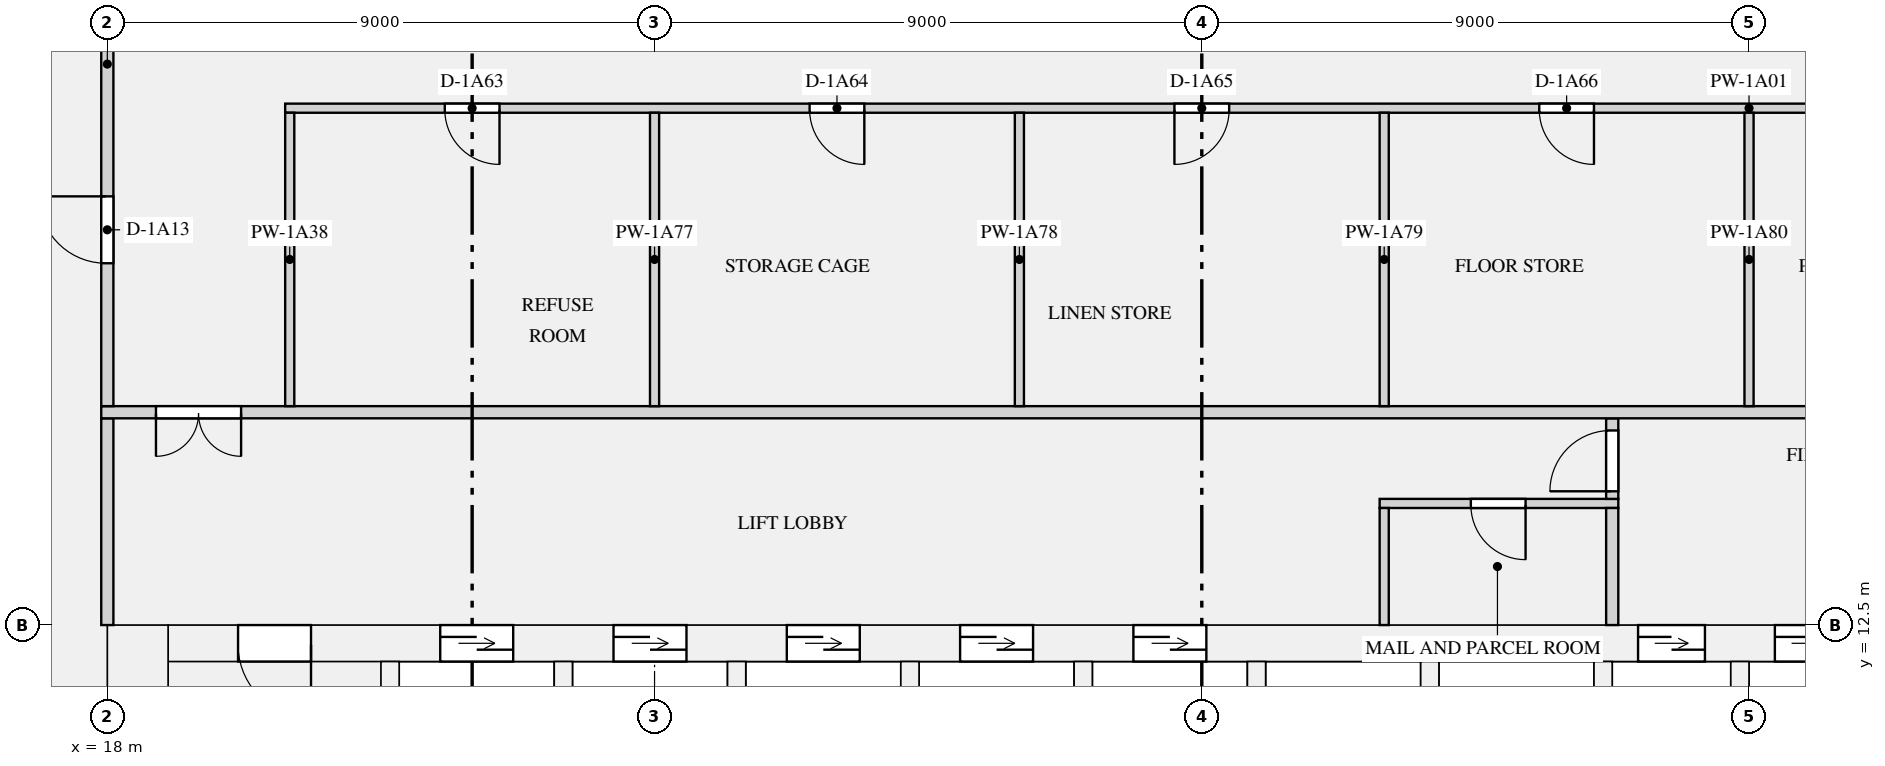
"""IFC4 building model, lengths in metres.
Left out: names, types, materials, properties, quantities, classifications, styles, units other than length and angle.
Written with IfcOpenShell. Run it as: python <this file> out.ifc"""

import sys

from ifc_helpers import new_model, si_unit, direction, frame, frame_2d, origin, place, context, subcontext, project, spatial, rectangle, extrude, element, fill, save


model = new_model("IFC4")
c1 = context("Model", 3, precision=1e-05, world=origin(), true_north=direction((0.0, 1.0)))
c2 = subcontext(c1, "Body", "Model", "MODEL_VIEW")
j1 = project(units=[si_unit("LENGTHUNIT", "METRE"), si_unit("PLANEANGLEUNIT", "RADIAN")], contexts=[c1])
p1 = place(None, origin())
s1 = spatial("IfcSite", under=j1, at=p1, CompositionType="ELEMENT")
p2 = place(p1, origin())
s2 = spatial("IfcBuilding", under=s1, at=p2, CompositionType="ELEMENT")
p3 = place(p2, frame((0.0, 0.0, 19.5)))
s3 = spatial("IfcBuildingStorey", under=s2, at=p3, CompositionType="ELEMENT", Elevation=19.5)
p4 = place(p3, frame((18.5, 0.0, 0.0), z_axis=(0.0, 0.0, 1.0), x_axis=(0.0, 1.0, 0.0)))
e1 = element("IfcWall", 1, at=p4, inside=s3, PredefinedType="SHEAR", context=c2, shape_type="SweptSolid", body=[
    extrude(rectangle(XDim=12.5, YDim=1.0, at=frame_2d((6.25, 0.0))), origin(), (0.0, 0.0, 1.0), 3.15),
])
p5 = place(p3, frame((19.0, 12.2, 0.0), z_axis=(0.0, 0.0, 1.0), x_axis=(1.0, 0.0, 0.0)))
e2 = element("IfcWall", 2, at=p5, inside=s3, PredefinedType="SHEAR", context=c2, shape_type="SweptSolid", body=[
    extrude(rectangle(XDim=34.0, YDim=0.6, at=frame_2d((17.0, 0.0))), origin(), (0.0, 0.0, 1.0), 3.15),
])
p6 = place(p5, frame((4.475, 0.0, 0.0)))
e3 = element("IfcOpeningElement", 3, at=p6, cuts=e2, PredefinedType="OPENING", context=c2, shape_type="SweptSolid", body=[
    extrude(rectangle(XDim=1.2, YDim=2.1, at=frame_2d((0.6, 1.05))), frame((0.0, 0.31, 0.0), z_axis=(0.0, -1.0, 0.0), x_axis=(1.0, 0.0, 0.0)), (0.0, 0.0, 1.0), 0.62),
])
p7 = place(p5, frame((7.325, 0.0, 0.0)))
e4 = element("IfcOpeningElement", 4, at=p7, cuts=e2, PredefinedType="OPENING", context=c2, shape_type="SweptSolid", body=[
    extrude(rectangle(XDim=1.2, YDim=2.1, at=frame_2d((0.6, 1.05))), frame((0.0, 0.31, 0.0), z_axis=(0.0, -1.0, 0.0), x_axis=(1.0, 0.0, 0.0)), (0.0, 0.0, 1.0), 0.62),
])
p8 = place(p5, frame((10.175, 0.0, 0.0)))
e5 = element("IfcOpeningElement", 5, at=p8, cuts=e2, PredefinedType="OPENING", context=c2, shape_type="SweptSolid", body=[
    extrude(rectangle(XDim=1.2, YDim=2.1, at=frame_2d((0.6, 1.05))), frame((0.0, 0.31, 0.0), z_axis=(0.0, -1.0, 0.0), x_axis=(1.0, 0.0, 0.0)), (0.0, 0.0, 1.0), 0.62),
])
p9 = place(p5, frame((13.025, 0.0, 0.0)))
e6 = element("IfcOpeningElement", 6, at=p9, cuts=e2, PredefinedType="OPENING", context=c2, shape_type="SweptSolid", body=[
    extrude(rectangle(XDim=1.2, YDim=2.1, at=frame_2d((0.6, 1.05))), frame((0.0, 0.31, 0.0), z_axis=(0.0, -1.0, 0.0), x_axis=(1.0, 0.0, 0.0)), (0.0, 0.0, 1.0), 0.62),
])
p10 = place(p5, frame((15.875, 0.0, 0.0)))
e7 = element("IfcOpeningElement", 7, at=p10, cuts=e2, PredefinedType="OPENING", context=c2, shape_type="SweptSolid", body=[
    extrude(rectangle(XDim=1.2, YDim=2.1, at=frame_2d((0.6, 1.05))), frame((0.0, 0.31, 0.0), z_axis=(0.0, -1.0, 0.0), x_axis=(1.0, 0.0, 0.0)), (0.0, 0.0, 1.0), 0.62),
])
p11 = place(p5, frame((24.175, 0.0, 0.0)))
e8 = element("IfcOpeningElement", 8, at=p11, cuts=e2, PredefinedType="OPENING", context=c2, shape_type="SweptSolid", body=[
    extrude(rectangle(XDim=1.1, YDim=2.1, at=frame_2d((0.55, 1.05))), frame((0.0, 0.31, 0.0), z_axis=(0.0, -1.0, 0.0), x_axis=(1.0, 0.0, 0.0)), (0.0, 0.0, 1.0), 0.62),
])
p12 = place(p5, frame((26.425, 0.0, 0.0)))
e9 = element("IfcOpeningElement", 9, at=p12, cuts=e2, PredefinedType="OPENING", context=c2, shape_type="SweptSolid", body=[
    extrude(rectangle(XDim=1.1, YDim=2.1, at=frame_2d((0.55, 1.05))), frame((0.0, 0.31, 0.0), z_axis=(0.0, -1.0, 0.0), x_axis=(1.0, 0.0, 0.0)), (0.0, 0.0, 1.0), 0.62),
])
p13 = place(p5, frame((28.675, 0.0, 0.0)))
e10 = element("IfcOpeningElement", 10, at=p13, cuts=e2, PredefinedType="OPENING", context=c2, shape_type="SweptSolid", body=[
    extrude(rectangle(XDim=1.1, YDim=2.1, at=frame_2d((0.55, 1.05))), frame((0.0, 0.31, 0.0), z_axis=(0.0, -1.0, 0.0), x_axis=(1.0, 0.0, 0.0)), (0.0, 0.0, 1.0), 0.62),
])
p14 = place(p5, frame((1.15, 0.0, 0.0)))
e11 = element("IfcOpeningElement", 11, at=p14, cuts=e2, PredefinedType="OPENING", context=c2, shape_type="SweptSolid", body=[
    extrude(rectangle(XDim=1.2, YDim=2.1, at=frame_2d((0.6, 1.05))), frame((0.0, 0.31, 0.0), z_axis=(0.0, -1.0, 0.0), x_axis=(1.0, 0.0, 0.0)), (0.0, 0.0, 1.0), 0.62),
])
p15 = place(p5, frame((31.65, 0.0, 0.0)))
e12 = element("IfcOpeningElement", 12, at=p15, cuts=e2, PredefinedType="OPENING", context=c2, shape_type="SweptSolid", body=[
    extrude(rectangle(XDim=1.2, YDim=2.1, at=frame_2d((0.6, 1.05))), frame((0.0, 0.31, 0.0), z_axis=(0.0, -1.0, 0.0), x_axis=(1.0, 0.0, 0.0)), (0.0, 0.0, 1.0), 0.62),
])
for number, where, z_axis, x_axis in (
    (13, (22.65, 9.35, 0.0), (0.0, 0.0, 1.0), (0.0, 1.0, 0.0)),
    (14, (25.5, 9.35, 0.0), (0.0, 0.0, 1.0), (0.0, 1.0, 0.0)),
    (15, (28.35, 9.35, 0.0), (0.0, 0.0, 1.0), (0.0, 1.0, 0.0)),
    (16, (31.2, 9.35, 0.0), (0.0, 0.0, 1.0), (0.0, 1.0, 0.0)),
    (17, (34.05, 9.35, 0.0), (0.0, 0.0, 1.0), (0.0, 1.0, 0.0)),
    (18, (36.9, 9.35, 0.0), (0.0, 0.0, 1.0), (0.0, 1.0, 0.0)),
    (19, (39.75, 9.35, 0.0), (0.0, 0.0, 1.0), (0.0, 1.0, 0.0)),
):
    element("IfcWall", number, at=place(p3, frame(where, z_axis=z_axis, x_axis=x_axis)), inside=s3, PredefinedType="SHEAR", context=c2, shape_type="SweptSolid", body=[
        extrude(rectangle(XDim=2.55, YDim=0.3, at=frame_2d((1.275, 0.0))), origin(), (0.0, 0.0, 1.0), 3.15),
    ])
for number, where, z_axis, x_axis in (
    (20, (42.6, 8.25, 0.0), (0.0, 0.0, 1.0), (0.0, 1.0, 0.0)),
    (21, (44.85, 8.25, 0.0), (0.0, 0.0, 1.0), (0.0, 1.0, 0.0)),
):
    element("IfcWall", number, at=place(p3, frame(where, z_axis=z_axis, x_axis=x_axis)), inside=s3, PredefinedType="SHEAR", context=c2, shape_type="SweptSolid", body=[
        extrude(rectangle(XDim=3.65, YDim=0.3, at=frame_2d((1.825, 0.0))), origin(), (0.0, 0.0, 1.0), 3.15),
    ])
p16 = place(p3, frame((38.925, 14.5, 0.0), z_axis=(0.0, 0.0, 1.0), x_axis=(1.0, 0.0, 0.0)))
e22 = element("IfcWall", 22, at=p16, inside=s3, PredefinedType="PARTITIONING", context=c2, shape_type="SweptSolid", body=[
    extrude(rectangle(XDim=3.925, YDim=0.15, at=frame_2d((1.962, 0.0))), origin(), (0.0, 0.0, 1.0), 2.83),
])
p17 = place(p16, frame((1.5, 0.0, 0.0)))
e23 = element("IfcOpeningElement", 23, at=p17, cuts=e22, PredefinedType="OPENING", context=c2, shape_type="SweptSolid", body=[
    extrude(rectangle(XDim=0.9, YDim=2.1, at=frame_2d((0.45, 1.05))), frame((0.0, 0.085, 0.0), z_axis=(0.0, -1.0, 0.0), x_axis=(1.0, 0.0, 0.0)), (0.0, 0.0, 1.0), 0.17),
])
p18 = place(p3, frame((18.0, 12.5, 0.0), z_axis=(0.0, 0.0, 1.0), x_axis=(0.0, 1.0, 0.0)))
e24 = element("IfcWall", 24, at=p18, inside=s3, PredefinedType="PARTITIONING", context=c2, shape_type="SweptSolid", body=[
    extrude(rectangle(XDim=3.4, YDim=0.2, at=frame_2d((1.7, 0.0))), origin(), (0.0, 0.0, 1.0), 2.83),
])
p19 = place(p3, frame((39.0, 12.5, 0.0), z_axis=(0.0, 0.0, 1.0), x_axis=(0.0, 1.0, 0.0)))
e25 = element("IfcWall", 25, at=p19, inside=s3, PredefinedType="PARTITIONING", context=c2, shape_type="SweptSolid", body=[
    extrude(rectangle(XDim=1.925, YDim=0.15, at=frame_2d((0.962, 0.0))), origin(), (0.0, 0.0, 1.0), 2.83),
])
p20 = place(p3, frame((42.75, 12.5, 0.0), z_axis=(0.0, 0.0, 1.0), x_axis=(0.0, 1.0, 0.0)))
e26 = element("IfcWall", 26, at=p20, inside=s3, PredefinedType="PARTITIONING", context=c2, shape_type="SweptSolid", body=[
    extrude(rectangle(XDim=1.925, YDim=0.2, at=frame_2d((0.962, 0.0))), origin(), (0.0, 0.0, 1.0), 2.83),
])
p21 = place(p3, frame((42.75, 14.575, 0.0), z_axis=(0.0, 0.0, 1.0), x_axis=(0.0, 1.0, 0.0)))
e27 = element("IfcWall", 27, at=p21, inside=s3, PredefinedType="PARTITIONING", context=c2, shape_type="SweptSolid", body=[
    extrude(rectangle(XDim=1.325, YDim=0.2, at=frame_2d((0.663, 0.0))), origin(), (0.0, 0.0, 1.0), 2.83),
])
p22 = place(p21, frame((0.125, 0.0, 0.0)))
e28 = element("IfcOpeningElement", 28, at=p22, cuts=e27, PredefinedType="OPENING", context=c2, shape_type="SweptSolid", body=[
    extrude(rectangle(XDim=1.0, YDim=2.1, at=frame_2d((0.5, 1.05))), frame((0.0, 0.11, 0.0), z_axis=(0.0, -1.0, 0.0), x_axis=(1.0, 0.0, 0.0)), (0.0, 0.0, 1.0), 0.22),
])
p23 = place(p3, frame((20.925, 21.0, 0.0), z_axis=(0.0, 0.0, 1.0), x_axis=(1.0, 0.0, 0.0)))
e29 = element("IfcWall", 29, at=p23, inside=s3, PredefinedType="PARTITIONING", context=c2, shape_type="SweptSolid", body=[
    extrude(rectangle(XDim=30.15, YDim=0.15, at=frame_2d((15.075, 0.0))), origin(), (0.0, 0.0, 1.0), 2.83),
])
p24 = place(p23, frame((2.625, 0.0, 0.0)))
e30 = element("IfcOpeningElement", 30, at=p24, cuts=e29, PredefinedType="OPENING", context=c2, shape_type="SweptSolid", body=[
    extrude(rectangle(XDim=0.9, YDim=2.1, at=frame_2d((0.45, 1.05))), frame((0.0, 0.085, 0.0), z_axis=(0.0, -1.0, 0.0), x_axis=(1.0, 0.0, 0.0)), (0.0, 0.0, 1.0), 0.17),
])
p25 = place(p23, frame((8.625, 0.0, 0.0)))
e31 = element("IfcOpeningElement", 31, at=p25, cuts=e29, PredefinedType="OPENING", context=c2, shape_type="SweptSolid", body=[
    extrude(rectangle(XDim=0.9, YDim=2.1, at=frame_2d((0.45, 1.05))), frame((0.0, 0.085, 0.0), z_axis=(0.0, -1.0, 0.0), x_axis=(1.0, 0.0, 0.0)), (0.0, 0.0, 1.0), 0.17),
])
p26 = place(p23, frame((14.625, 0.0, 0.0)))
e32 = element("IfcOpeningElement", 32, at=p26, cuts=e29, PredefinedType="OPENING", context=c2, shape_type="SweptSolid", body=[
    extrude(rectangle(XDim=0.9, YDim=2.1, at=frame_2d((0.45, 1.05))), frame((0.0, 0.085, 0.0), z_axis=(0.0, -1.0, 0.0), x_axis=(1.0, 0.0, 0.0)), (0.0, 0.0, 1.0), 0.17),
])
p27 = place(p23, frame((20.625, 0.0, 0.0)))
e33 = element("IfcOpeningElement", 33, at=p27, cuts=e29, PredefinedType="OPENING", context=c2, shape_type="SweptSolid", body=[
    extrude(rectangle(XDim=0.9, YDim=2.1, at=frame_2d((0.45, 1.05))), frame((0.0, 0.085, 0.0), z_axis=(0.0, -1.0, 0.0), x_axis=(1.0, 0.0, 0.0)), (0.0, 0.0, 1.0), 0.17),
])
p28 = place(p23, frame((26.625, 0.0, 0.0)))
e34 = element("IfcOpeningElement", 34, at=p28, cuts=e29, PredefinedType="OPENING", context=c2, shape_type="SweptSolid", body=[
    extrude(rectangle(XDim=0.9, YDim=2.1, at=frame_2d((0.45, 1.05))), frame((0.0, 0.085, 0.0), z_axis=(0.0, -1.0, 0.0), x_axis=(1.0, 0.0, 0.0)), (0.0, 0.0, 1.0), 0.17),
])
p29 = place(p3, frame((17.9, 16.0, 0.0), z_axis=(0.0, 0.0, 1.0), x_axis=(1.0, 0.0, 0.0)))
e35 = element("IfcWall", 35, at=p29, inside=s3, PredefinedType="PARTITIONING", context=c2, shape_type="SweptSolid", body=[
    extrude(rectangle(XDim=36.2, YDim=0.2, at=frame_2d((18.1, 0.0))), origin(), (0.0, 0.0, 1.0), 2.83),
])
p30 = place(p29, frame((0.9, 0.0, 0.0)))
e36 = element("IfcOpeningElement", 36, at=p30, cuts=e35, PredefinedType="OPENING", context=c2, shape_type="SweptSolid", body=[
    extrude(rectangle(XDim=1.4, YDim=2.1, at=frame_2d((0.7, 1.05))), frame((0.0, 0.11, 0.0), z_axis=(0.0, -1.0, 0.0), x_axis=(1.0, 0.0, 0.0)), (0.0, 0.0, 1.0), 0.22),
])
p31 = place(p29, frame((33.9, 0.0, 0.0)))
e37 = element("IfcOpeningElement", 37, at=p31, cuts=e35, PredefinedType="OPENING", context=c2, shape_type="SweptSolid", body=[
    extrude(rectangle(XDim=1.4, YDim=2.1, at=frame_2d((0.7, 1.05))), frame((0.0, 0.11, 0.0), z_axis=(0.0, -1.0, 0.0), x_axis=(1.0, 0.0, 0.0)), (0.0, 0.0, 1.0), 0.22),
])
p32 = place(p3, frame((18.0, 16.1, 0.0), z_axis=(0.0, 0.0, 1.0), x_axis=(0.0, 1.0, 0.0)))
e38 = element("IfcWall", 38, at=p32, inside=s3, PredefinedType="PARTITIONING", context=c2, shape_type="SweptSolid", body=[
    extrude(rectangle(XDim=7.8, YDim=0.2, at=frame_2d((3.9, 0.0))), origin(), (0.0, 0.0, 1.0), 2.83),
])
p33 = place(p32, frame((2.35, 0.0, 0.0)))
e39 = element("IfcOpeningElement", 39, at=p33, cuts=e38, PredefinedType="OPENING", context=c2, shape_type="SweptSolid", body=[
    extrude(rectangle(XDim=1.1, YDim=2.1, at=frame_2d((0.55, 1.05))), frame((0.0, 0.11, 0.0), z_axis=(0.0, -1.0, 0.0), x_axis=(1.0, 0.0, 0.0)), (0.0, 0.0, 1.0), 0.22),
])
for number, where, z_axis, x_axis in (
    (40, (21.0, 16.1, 0.0), (0.0, 0.0, 1.0), (0.0, 1.0, 0.0)),
    (41, (27.0, 16.1, 0.0), (0.0, 0.0, 1.0), (0.0, 1.0, 0.0)),
    (42, (33.0, 16.1, 0.0), (0.0, 0.0, 1.0), (0.0, 1.0, 0.0)),
    (43, (39.0, 16.1, 0.0), (0.0, 0.0, 1.0), (0.0, 1.0, 0.0)),
    (44, (45.0, 16.1, 0.0), (0.0, 0.0, 1.0), (0.0, 1.0, 0.0)),
):
    element("IfcWall", number, at=place(p3, frame(where, z_axis=z_axis, x_axis=x_axis)), inside=s3, PredefinedType="PARTITIONING", context=c2, shape_type="SweptSolid", body=[
        extrude(rectangle(XDim=4.825, YDim=0.15, at=frame_2d((2.413, 0.0))), origin(), (0.0, 0.0, 1.0), 2.83),
    ])
p34 = place(p6, origin())
e45 = element("IfcDoor", 45, at=p34, inside=s3, OperationType="DOUBLE_DOOR_SLIDING", PredefinedType="DOOR", context=c2, shape_type="SweptSolid", body=[
    extrude(rectangle(XDim=1.2, YDim=2.1, at=frame_2d((0.6, 1.05))), frame((0.0, 0.025, 0.0), z_axis=(0.0, -1.0, 0.0), x_axis=(1.0, 0.0, 0.0)), (0.0, 0.0, 1.0), 0.05),
])
fill(e3, e45)
p35 = place(p7, origin())
e46 = element("IfcDoor", 46, at=p35, inside=s3, OperationType="DOUBLE_DOOR_SLIDING", PredefinedType="DOOR", context=c2, shape_type="SweptSolid", body=[
    extrude(rectangle(XDim=1.2, YDim=2.1, at=frame_2d((0.6, 1.05))), frame((0.0, 0.025, 0.0), z_axis=(0.0, -1.0, 0.0), x_axis=(1.0, 0.0, 0.0)), (0.0, 0.0, 1.0), 0.05),
])
fill(e4, e46)
p36 = place(p8, origin())
e47 = element("IfcDoor", 47, at=p36, inside=s3, OperationType="DOUBLE_DOOR_SLIDING", PredefinedType="DOOR", context=c2, shape_type="SweptSolid", body=[
    extrude(rectangle(XDim=1.2, YDim=2.1, at=frame_2d((0.6, 1.05))), frame((0.0, 0.025, 0.0), z_axis=(0.0, -1.0, 0.0), x_axis=(1.0, 0.0, 0.0)), (0.0, 0.0, 1.0), 0.05),
])
fill(e5, e47)
p37 = place(p9, origin())
e48 = element("IfcDoor", 48, at=p37, inside=s3, OperationType="DOUBLE_DOOR_SLIDING", PredefinedType="DOOR", context=c2, shape_type="SweptSolid", body=[
    extrude(rectangle(XDim=1.2, YDim=2.1, at=frame_2d((0.6, 1.05))), frame((0.0, 0.025, 0.0), z_axis=(0.0, -1.0, 0.0), x_axis=(1.0, 0.0, 0.0)), (0.0, 0.0, 1.0), 0.05),
])
fill(e6, e48)
p38 = place(p10, origin())
e49 = element("IfcDoor", 49, at=p38, inside=s3, OperationType="DOUBLE_DOOR_SLIDING", PredefinedType="DOOR", context=c2, shape_type="SweptSolid", body=[
    extrude(rectangle(XDim=1.2, YDim=2.1, at=frame_2d((0.6, 1.05))), frame((0.0, 0.025, 0.0), z_axis=(0.0, -1.0, 0.0), x_axis=(1.0, 0.0, 0.0)), (0.0, 0.0, 1.0), 0.05),
])
fill(e7, e49)
p39 = place(p11, origin())
e50 = element("IfcDoor", 50, at=p39, inside=s3, OperationType="DOUBLE_DOOR_SLIDING", PredefinedType="DOOR", context=c2, shape_type="SweptSolid", body=[
    extrude(rectangle(XDim=1.1, YDim=2.1, at=frame_2d((0.55, 1.05))), frame((0.0, 0.025, 0.0), z_axis=(0.0, -1.0, 0.0), x_axis=(1.0, 0.0, 0.0)), (0.0, 0.0, 1.0), 0.05),
])
fill(e8, e50)
p40 = place(p12, origin())
e51 = element("IfcDoor", 51, at=p40, inside=s3, OperationType="DOUBLE_DOOR_SLIDING", PredefinedType="DOOR", context=c2, shape_type="SweptSolid", body=[
    extrude(rectangle(XDim=1.1, YDim=2.1, at=frame_2d((0.55, 1.05))), frame((0.0, 0.025, 0.0), z_axis=(0.0, -1.0, 0.0), x_axis=(1.0, 0.0, 0.0)), (0.0, 0.0, 1.0), 0.05),
])
fill(e9, e51)
p41 = place(p17, frame((0.9, 0.0, 0.0), z_axis=(0.0, 0.0, 1.0), x_axis=(-1.0, 0.0, 0.0)))
e52 = element("IfcDoor", 52, at=p41, inside=s3, OperationType="SINGLE_SWING_LEFT", PredefinedType="DOOR", context=c2, shape_type="SweptSolid", body=[
    extrude(rectangle(XDim=0.9, YDim=2.1, at=frame_2d((0.45, 1.05))), frame((0.0, 0.025, 0.0), z_axis=(0.0, -1.0, 0.0), x_axis=(1.0, 0.0, 0.0)), (0.0, 0.0, 1.0), 0.05),
])
fill(e23, e52)
p42 = place(p14, frame((1.2, 0.0, 0.0), z_axis=(0.0, 0.0, 1.0), x_axis=(-1.0, 0.0, 0.0)))
e53 = element("IfcDoor", 53, at=p42, inside=s3, OperationType="SINGLE_SWING_LEFT", PredefinedType="DOOR", context=c2, shape_type="SweptSolid", body=[
    extrude(rectangle(XDim=1.2, YDim=2.1, at=frame_2d((0.6, 1.05))), frame((0.0, 0.025, 0.0), z_axis=(0.0, -1.0, 0.0), x_axis=(1.0, 0.0, 0.0)), (0.0, 0.0, 1.0), 0.05),
])
fill(e11, e53)
p43 = place(p22, origin())
e54 = element("IfcDoor", 54, at=p43, inside=s3, OperationType="SINGLE_SWING_LEFT", PredefinedType="DOOR", context=c2, shape_type="SweptSolid", body=[
    extrude(rectangle(XDim=1.0, YDim=2.1, at=frame_2d((0.5, 1.05))), frame((0.0, 0.025, 0.0), z_axis=(0.0, -1.0, 0.0), x_axis=(1.0, 0.0, 0.0)), (0.0, 0.0, 1.0), 0.05),
])
fill(e28, e54)
p44 = place(p30, frame((1.4, 0.0, 0.0), z_axis=(0.0, 0.0, 1.0), x_axis=(-1.0, 0.0, 0.0)))
e55 = element("IfcDoor", 55, at=p44, inside=s3, OperationType="DOUBLE_DOOR_SINGLE_SWING", PredefinedType="DOOR", context=c2, shape_type="SweptSolid", body=[
    extrude(rectangle(XDim=1.4, YDim=2.1, at=frame_2d((0.7, 1.05))), frame((0.0, 0.025, 0.0), z_axis=(0.0, -1.0, 0.0), x_axis=(1.0, 0.0, 0.0)), (0.0, 0.0, 1.0), 0.05),
])
fill(e36, e55)
p45 = place(p33, origin())
e56 = element("IfcDoor", 56, at=p45, inside=s3, OperationType="SINGLE_SWING_RIGHT", PredefinedType="DOOR", context=c2, shape_type="SweptSolid", body=[
    extrude(rectangle(XDim=1.1, YDim=2.1, at=frame_2d((0.55, 1.05))), frame((0.0, 0.025, 0.0), z_axis=(0.0, -1.0, 0.0), x_axis=(1.0, 0.0, 0.0)), (0.0, 0.0, 1.0), 0.05),
])
fill(e39, e56)
p46 = place(p24, frame((0.9, 0.0, 0.0), z_axis=(0.0, 0.0, 1.0), x_axis=(-1.0, 0.0, 0.0)))
e57 = element("IfcDoor", 57, at=p46, inside=s3, OperationType="SINGLE_SWING_LEFT", PredefinedType="DOOR", context=c2, shape_type="SweptSolid", body=[
    extrude(rectangle(XDim=0.9, YDim=2.1, at=frame_2d((0.45, 1.05))), frame((0.0, 0.025, 0.0), z_axis=(0.0, -1.0, 0.0), x_axis=(1.0, 0.0, 0.0)), (0.0, 0.0, 1.0), 0.05),
])
fill(e30, e57)
p47 = place(p25, frame((0.9, 0.0, 0.0), z_axis=(0.0, 0.0, 1.0), x_axis=(-1.0, 0.0, 0.0)))
e58 = element("IfcDoor", 58, at=p47, inside=s3, OperationType="SINGLE_SWING_LEFT", PredefinedType="DOOR", context=c2, shape_type="SweptSolid", body=[
    extrude(rectangle(XDim=0.9, YDim=2.1, at=frame_2d((0.45, 1.05))), frame((0.0, 0.025, 0.0), z_axis=(0.0, -1.0, 0.0), x_axis=(1.0, 0.0, 0.0)), (0.0, 0.0, 1.0), 0.05),
])
fill(e31, e58)
p48 = place(p26, frame((0.9, 0.0, 0.0), z_axis=(0.0, 0.0, 1.0), x_axis=(-1.0, 0.0, 0.0)))
e59 = element("IfcDoor", 59, at=p48, inside=s3, OperationType="SINGLE_SWING_RIGHT", PredefinedType="DOOR", context=c2, shape_type="SweptSolid", body=[
    extrude(rectangle(XDim=0.9, YDim=2.1, at=frame_2d((0.45, 1.05))), frame((0.0, 0.025, 0.0), z_axis=(0.0, -1.0, 0.0), x_axis=(1.0, 0.0, 0.0)), (0.0, 0.0, 1.0), 0.05),
])
fill(e32, e59)
p49 = place(p27, frame((0.9, 0.0, 0.0), z_axis=(0.0, 0.0, 1.0), x_axis=(-1.0, 0.0, 0.0)))
e60 = element("IfcDoor", 60, at=p49, inside=s3, OperationType="SINGLE_SWING_LEFT", PredefinedType="DOOR", context=c2, shape_type="SweptSolid", body=[
    extrude(rectangle(XDim=0.9, YDim=2.1, at=frame_2d((0.45, 1.05))), frame((0.0, 0.025, 0.0), z_axis=(0.0, -1.0, 0.0), x_axis=(1.0, 0.0, 0.0)), (0.0, 0.0, 1.0), 0.05),
])
fill(e33, e60)
save(model, sys.argv[1])
